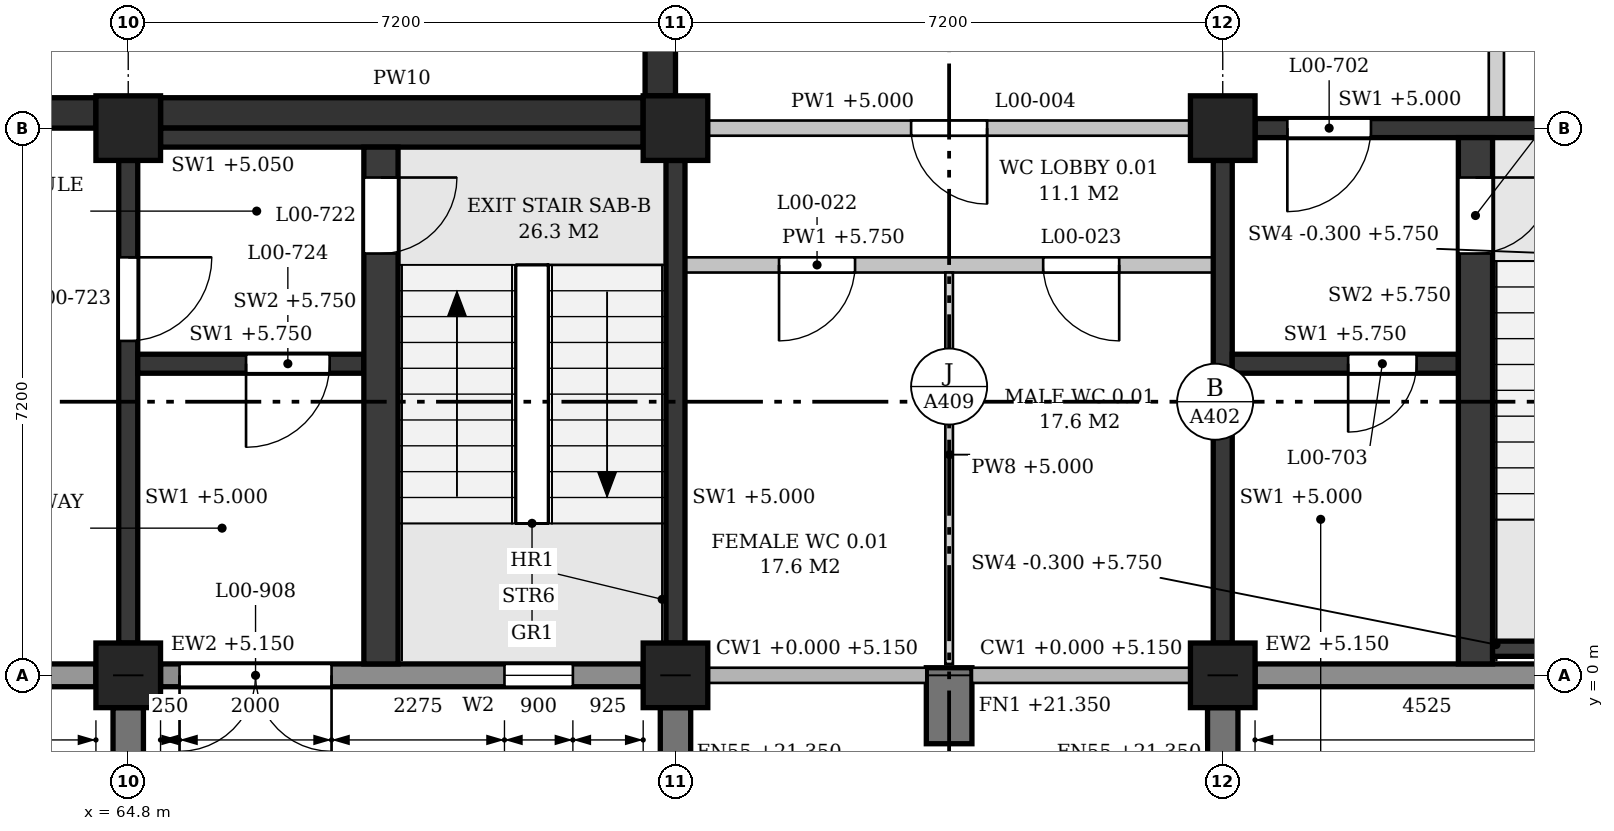
"""IFC4 building model, lengths in metres.
Left out: names, types, materials, properties, quantities, classifications, styles, units other than length and angle.
Written with IfcOpenShell. Run it as: python <this file> out.ifc"""

import sys

from ifc_helpers import new_model, si_unit, direction, frame, frame_2d, origin, origin_2d, place, context, subcontext, project, spatial, polyline, rectangle, outline, extrude, element, fill, save


model = new_model("IFC4")
c1 = context("Model", 3, precision=1e-05, world=origin(), true_north=direction((0.0, 1.0)))
c2 = subcontext(c1, "Body", "Model", "MODEL_VIEW")
j1 = project(units=[si_unit("LENGTHUNIT", "METRE"), si_unit("PLANEANGLEUNIT", "RADIAN")], contexts=[c1])
p1 = place(None, origin())
s1 = spatial("IfcSite", under=j1, at=p1, CompositionType="ELEMENT")
p2 = place(p1, origin())
s2 = spatial("IfcBuilding", under=s1, at=p2, CompositionType="ELEMENT")
p3 = place(p2, origin())
s3 = spatial("IfcBuildingStorey", under=s2, at=p3, CompositionType="ELEMENT", Elevation=0.0)
for number, where, z_axis, x_axis in (
    (1, (64.8, 0.0, 0.0), (0.0, 0.0, 1.0), (1.0, 0.0, 0.0)),
    (2, (64.8, 7.2, 0.0), (0.0, 0.0, 1.0), (1.0, 0.0, 0.0)),
    (3, (72.0, 0.0, 0.0), (0.0, 0.0, 1.0), (1.0, 0.0, 0.0)),
    (4, (72.0, 7.2, 0.0), (0.0, 0.0, 1.0), (1.0, 0.0, 0.0)),
    (5, (79.2, 0.0, 0.0), (0.0, 0.0, 1.0), (1.0, 0.0, 0.0)),
    (6, (79.2, 7.2, 0.0), (0.0, 0.0, 1.0), (1.0, 0.0, 0.0)),
):
    element("IfcColumn", number, at=place(p3, frame(where, z_axis=z_axis, x_axis=x_axis)), inside=s3, PredefinedType="COLUMN", context=c2, shape_type="SweptSolid", body=[
        extrude(rectangle(XDim=0.85, YDim=0.85, at=origin_2d()), origin(), (0.0, 0.0, 1.0), 6.0),
    ])
p4 = place(p3, frame((58.025, 0.0, 0.0), z_axis=(0.0, 0.0, 1.0), x_axis=(1.0, 0.0, 0.0)))
e7 = element("IfcWall", 7, at=p4, inside=s3, PredefinedType="STANDARD", context=c2, shape_type="SweptSolid", body=[
    extrude(rectangle(XDim=6.35, YDim=0.3, at=frame_2d((3.175, 0.0))), origin(), (0.0, 0.0, 1.0), 5.15),
])
p5 = place(p4, frame((1.975, 0.0, 0.0)))
e8 = element("IfcOpeningElement", 8, at=p5, cuts=e7, PredefinedType="OPENING", context=c2, shape_type="SweptSolid", body=[
    extrude(outline(polyline([(0.0, 0.0), (2.4, 0.0), (2.4, 2.0), (1.2, 3.2), (0.0, 2.0), (0.0, 0.0)])), frame((0.0, 0.16, 0.0), z_axis=(0.0, -1.0, 0.0), x_axis=(1.0, 0.0, 0.0)), (0.0, 0.0, 1.0), 0.32),
])
p6 = place(p3, frame((65.225, 0.0, 0.0), z_axis=(0.0, 0.0, 1.0), x_axis=(1.0, 0.0, 0.0)))
e9 = element("IfcWall", 9, at=p6, inside=s3, PredefinedType="STANDARD", context=c2, shape_type="SweptSolid", body=[
    extrude(rectangle(XDim=6.35, YDim=0.3, at=frame_2d((3.175, 0.0))), origin(), (0.0, 0.0, 1.0), 5.15),
])
p7 = place(p6, frame((0.25, 0.0, 0.0)))
e10 = element("IfcOpeningElement", 10, at=p7, cuts=e9, PredefinedType="OPENING", context=c2, shape_type="SweptSolid", body=[
    extrude(rectangle(XDim=2.0, YDim=2.1, at=frame_2d((1.0, 1.05))), frame((0.0, 0.16, 0.0), z_axis=(0.0, -1.0, 0.0), x_axis=(1.0, 0.0, 0.0)), (0.0, 0.0, 1.0), 0.32),
])
p8 = place(p6, frame((4.525, 0.0, 0.9)))
e11 = element("IfcOpeningElement", 11, at=p8, cuts=e9, PredefinedType="OPENING", context=c2, shape_type="SweptSolid", body=[
    extrude(outline(polyline([(0.0, 0.0), (0.9, 0.0), (0.9, 3.55), (0.45, 4.0), (0.0, 3.55), (0.0, 0.0)])), frame((0.0, 0.16, 0.0), z_axis=(0.0, -1.0, 0.0), x_axis=(1.0, 0.0, 0.0)), (0.0, 0.0, 1.0), 0.32),
])
p9 = place(p3, frame((79.625, 0.0, 0.0), z_axis=(0.0, 0.0, 1.0), x_axis=(1.0, 0.0, 0.0)))
e12 = element("IfcWall", 12, at=p9, inside=s3, PredefinedType="STANDARD", context=c2, shape_type="SweptSolid", body=[
    extrude(rectangle(XDim=6.35, YDim=0.3, at=frame_2d((3.175, 0.0))), origin(), (0.0, 0.0, 1.0), 5.15),
])
p10 = place(p9, frame((4.525, 0.0, 0.9)))
e13 = element("IfcOpeningElement", 13, at=p10, cuts=e12, PredefinedType="OPENING", context=c2, shape_type="SweptSolid", body=[
    extrude(outline(polyline([(0.0, 0.0), (0.9, 0.0), (0.9, 3.55), (0.45, 4.0), (0.0, 3.55), (0.0, 0.0)])), frame((0.0, 0.16, 0.0), z_axis=(0.0, -1.0, 0.0), x_axis=(1.0, 0.0, 0.0)), (0.0, 0.0, 1.0), 0.32),
])
p11 = place(p3, frame((75.6, 0.1, 0.0), z_axis=(0.0, 0.0, 1.0), x_axis=(0.0, -1.0, 0.0)))
e14 = element("IfcWall", 14, at=p11, inside=s3, PredefinedType="POLYGONAL", context=c2, shape_type="SweptSolid", body=[
    extrude(outline(polyline([(1.0, 0.0), (1.0, 20.975), (0.75, 21.35), (0.35, 21.35), (0.35, 20.75), (0.0, 20.75), (0.0, 16.8), (0.35, 16.8), (0.35, 15.95), (0.0, 15.95), (0.0, 11.4), (0.35, 11.4), (0.35, 10.55), (0.0, 10.55), (0.0, 6.0), (0.35, 6.0), (0.35, 5.15), (0.0, 5.15), (0.0, 0.0), (1.0, 0.0)])), frame((0.0, 0.3, 0.0), z_axis=(0.0, -1.0, 0.0), x_axis=(1.0, 0.0, 0.0)), (0.0, 0.0, 1.0), 0.6),
])
p12 = place(p3, frame((64.8, -0.425, 0.0), z_axis=(0.0, 0.0, 1.0), x_axis=(0.0, -1.0, 0.0)))
e15 = element("IfcWall", 15, at=p12, inside=s3, PredefinedType="POLYGONAL", context=c2, shape_type="SweptSolid", body=[
    extrude(outline(polyline([(1.2, 0.0), (1.2, 9.825), (0.15, 11.4), (0.0, 11.4), (0.0, 0.0), (1.2, 0.0)])), frame((0.0, 0.2, 0.0), z_axis=(0.0, -1.0, 0.0), x_axis=(1.0, 0.0, 0.0)), (0.0, 0.0, 1.0), 0.4),
])
for number, where, z_axis, x_axis in (
    (16, (72.0, -0.425, 0.0), (0.0, 0.0, 1.0), (0.0, -1.0, 0.0)),
    (17, (79.2, -0.425, 0.0), (0.0, 0.0, 1.0), (0.0, -1.0, 0.0)),
):
    element("IfcWall", number, at=place(p3, frame(where, z_axis=z_axis, x_axis=x_axis)), inside=s3, PredefinedType="POLYGONAL", context=c2, shape_type="SweptSolid", body=[
        extrude(outline(polyline([(1.2, 0.0), (1.2, 20.825), (0.85, 21.35), (0.0, 21.35), (0.0, 0.0), (1.2, 0.0)])), frame((0.0, 0.2, 0.0), z_axis=(0.0, -1.0, 0.0), x_axis=(1.0, 0.0, 0.0)), (0.0, 0.0, 1.0), 0.4),
    ])
p13 = place(p3, frame((79.625, 7.2, 0.0), z_axis=(0.0, 0.0, 1.0), x_axis=(1.0, 0.0, 0.0)))
e18 = element("IfcWall", 18, at=p13, inside=s3, PredefinedType="SHEAR", context=c2, shape_type="SweptSolid", body=[
    extrude(rectangle(XDim=6.35, YDim=0.25, at=frame_2d((3.175, 0.0))), origin(), (0.0, 0.0, 1.0), 5.0),
])
p14 = place(p13, frame((0.425, 0.0, 0.0)))
e19 = element("IfcOpeningElement", 19, at=p14, cuts=e18, PredefinedType="OPENING", context=c2, shape_type="SweptSolid", body=[
    extrude(rectangle(XDim=1.1, YDim=2.1, at=frame_2d((0.55, 1.05))), frame((0.0, 0.135, 0.0), z_axis=(0.0, -1.0, 0.0), x_axis=(1.0, 0.0, 0.0)), (0.0, 0.0, 1.0), 0.27),
])
p15 = place(p3, frame((79.2, 0.425, 0.0), z_axis=(0.0, 0.0, 1.0), x_axis=(0.0, 1.0, 0.0)))
e20 = element("IfcWall", 20, at=p15, inside=s3, PredefinedType="SHEAR", context=c2, shape_type="SweptSolid", body=[
    extrude(rectangle(XDim=6.35, YDim=0.25, at=frame_2d((3.175, 0.0))), origin(), (0.0, 0.0, 1.0), 5.0),
])
p16 = place(p3, frame((82.75, 0.35, -0.3), z_axis=(0.0, 0.0, 1.0), x_axis=(1.0, 0.0, 0.0)))
e21 = element("IfcWall", 21, at=p16, inside=s3, PredefinedType="SHEAR", context=c2, shape_type="SweptSolid", body=[
    extrude(rectangle(XDim=1.4, YDim=0.2, at=frame_2d((0.7, 0.0))), origin(), (0.0, 0.0, 1.0), 6.05),
])
p17 = place(p3, frame((82.525, 0.15, 0.0), z_axis=(0.0, 0.0, 1.0), x_axis=(0.0, 1.0, 0.0)))
e22 = element("IfcWall", 22, at=p17, inside=s3, PredefinedType="SHEAR", context=c2, shape_type="SweptSolid", body=[
    extrude(rectangle(XDim=6.925, YDim=0.45, at=frame_2d((3.462, 0.0))), origin(), (0.0, 0.0, 1.0), 5.75),
])
p18 = place(p17, frame((5.4, 0.0, 0.0)))
e23 = element("IfcOpeningElement", 23, at=p18, cuts=e22, PredefinedType="OPENING", context=c2, shape_type="SweptSolid", body=[
    extrude(rectangle(XDim=1.0, YDim=2.1, at=frame_2d((0.5, 1.05))), frame((0.0, 0.235, 0.0), z_axis=(0.0, -1.0, 0.0), x_axis=(1.0, 0.0, 0.0)), (0.0, 0.0, 1.0), 0.47),
])
p19 = place(p3, frame((79.325, 4.1, 0.0), z_axis=(0.0, 0.0, 1.0), x_axis=(1.0, 0.0, 0.0)))
e24 = element("IfcWall", 24, at=p19, inside=s3, PredefinedType="SHEAR", context=c2, shape_type="SweptSolid", body=[
    extrude(rectangle(XDim=2.975, YDim=0.25, at=frame_2d((1.488, 0.0))), origin(), (0.0, 0.0, 1.0), 5.75),
])
p20 = place(p19, frame((1.525, 0.0, 0.0)))
e25 = element("IfcOpeningElement", 25, at=p20, cuts=e24, PredefinedType="OPENING", context=c2, shape_type="SweptSolid", body=[
    extrude(rectangle(XDim=0.9, YDim=2.1, at=frame_2d((0.45, 1.05))), frame((0.0, 0.135, 0.0), z_axis=(0.0, -1.0, 0.0), x_axis=(1.0, 0.0, 0.0)), (0.0, 0.0, 1.0), 0.27),
])
p21 = place(p3, frame((65.225, 7.075, 0.0), z_axis=(0.0, 0.0, 1.0), x_axis=(1.0, 0.0, 0.0)))
e26 = element("IfcWall", 26, at=p21, inside=s3, PredefinedType="SHEAR", context=c2, shape_type="SweptSolid", body=[
    extrude(rectangle(XDim=6.35, YDim=0.25, at=frame_2d((3.175, 0.0))), origin(), (0.0, 0.0, 1.0), 5.05),
])
p22 = place(p3, frame((72.0, 0.425, 0.0), z_axis=(0.0, 0.0, 1.0), x_axis=(0.0, 1.0, 0.0)))
e27 = element("IfcWall", 27, at=p22, inside=s3, PredefinedType="SHEAR", context=c2, shape_type="SweptSolid", body=[
    extrude(rectangle(XDim=6.35, YDim=0.25, at=frame_2d((3.175, 0.0))), origin(), (0.0, 0.0, 1.0), 5.0),
])
p23 = place(p3, frame((64.8, 0.425, 0.0), z_axis=(0.0, 0.0, 1.0), x_axis=(0.0, 1.0, 0.0)))
e28 = element("IfcWall", 28, at=p23, inside=s3, PredefinedType="SHEAR", context=c2, shape_type="SweptSolid", body=[
    extrude(rectangle(XDim=6.35, YDim=0.25, at=frame_2d((3.175, 0.0))), origin(), (0.0, 0.0, 1.0), 5.0),
])
p24 = place(p23, frame((3.975, 0.0, 0.0)))
e29 = element("IfcOpeningElement", 29, at=p24, cuts=e28, PredefinedType="OPENING", context=c2, shape_type="SweptSolid", body=[
    extrude(rectangle(XDim=1.1, YDim=2.1, at=frame_2d((0.55, 1.05))), frame((0.0, 0.135, 0.0), z_axis=(0.0, -1.0, 0.0), x_axis=(1.0, 0.0, 0.0)), (0.0, 0.0, 1.0), 0.27),
])
p25 = place(p3, frame((68.125, 0.15, 0.0), z_axis=(0.0, 0.0, 1.0), x_axis=(0.0, 1.0, 0.0)))
e30 = element("IfcWall", 30, at=p25, inside=s3, PredefinedType="SHEAR", context=c2, shape_type="SweptSolid", body=[
    extrude(rectangle(XDim=6.8, YDim=0.45, at=frame_2d((3.4, 0.0))), origin(), (0.0, 0.0, 1.0), 5.75),
])
p26 = place(p25, frame((5.4, 0.0, 0.0)))
e31 = element("IfcOpeningElement", 31, at=p26, cuts=e30, PredefinedType="OPENING", context=c2, shape_type="SweptSolid", body=[
    extrude(rectangle(XDim=1.0, YDim=2.1, at=frame_2d((0.5, 1.05))), frame((0.0, 0.235, 0.0), z_axis=(0.0, -1.0, 0.0), x_axis=(1.0, 0.0, 0.0)), (0.0, 0.0, 1.0), 0.47),
])
p27 = place(p3, frame((64.925, 4.1, 0.0), z_axis=(0.0, 0.0, 1.0), x_axis=(1.0, 0.0, 0.0)))
e32 = element("IfcWall", 32, at=p27, inside=s3, PredefinedType="SHEAR", context=c2, shape_type="SweptSolid", body=[
    extrude(rectangle(XDim=2.975, YDim=0.25, at=frame_2d((1.487, 0.0))), origin(), (0.0, 0.0, 1.0), 5.75),
])
p28 = place(p27, frame((1.425, 0.0, 0.0)))
e33 = element("IfcOpeningElement", 33, at=p28, cuts=e32, PredefinedType="OPENING", context=c2, shape_type="SweptSolid", body=[
    extrude(rectangle(XDim=1.1, YDim=2.1, at=frame_2d((0.55, 1.05))), frame((0.0, 0.135, 0.0), z_axis=(0.0, -1.0, 0.0), x_axis=(1.0, 0.0, 0.0)), (0.0, 0.0, 1.0), 0.27),
])
p29 = place(p3, frame((72.125, 5.4, 0.0), z_axis=(0.0, 0.0, 1.0), x_axis=(1.0, 0.0, 0.0)))
e34 = element("IfcWall", 34, at=p29, inside=s3, PredefinedType="PARTITIONING", context=c2, shape_type="SweptSolid", body=[
    extrude(outline(polyline([(0.0, 0.0), (6.95, 0.0), (6.95, 5.0), (6.825, 5.0), (6.825, 5.75), (0.125, 5.75), (0.125, 5.0), (0.0, 5.0), (0.0, 0.0)])), frame((0.0, 0.1, 0.0), z_axis=(0.0, -1.0, 0.0), x_axis=(1.0, 0.0, 0.0)), (0.0, 0.0, 1.0), 0.2),
])
p30 = place(p29, frame((1.238, 0.0, 0.0)))
e35 = element("IfcOpeningElement", 35, at=p30, cuts=e34, PredefinedType="OPENING", context=c2, shape_type="SweptSolid", body=[
    extrude(rectangle(XDim=1.0, YDim=2.1, at=frame_2d((0.5, 1.05))), frame((0.0, 0.11, 0.0), z_axis=(0.0, -1.0, 0.0), x_axis=(1.0, 0.0, 0.0)), (0.0, 0.0, 1.0), 0.22),
])
p31 = place(p29, frame((4.712, 0.0, 0.0)))
e36 = element("IfcOpeningElement", 36, at=p31, cuts=e34, PredefinedType="OPENING", context=c2, shape_type="SweptSolid", body=[
    extrude(rectangle(XDim=1.0, YDim=2.1, at=frame_2d((0.5, 1.05))), frame((0.0, 0.11, 0.0), z_axis=(0.0, -1.0, 0.0), x_axis=(1.0, 0.0, 0.0)), (0.0, 0.0, 1.0), 0.22),
])
p32 = place(p3, frame((72.425, 7.2, 0.0), z_axis=(0.0, 0.0, 1.0), x_axis=(1.0, 0.0, 0.0)))
e37 = element("IfcWall", 37, at=p32, inside=s3, PredefinedType="PARTITIONING", context=c2, shape_type="SweptSolid", body=[
    extrude(rectangle(XDim=6.35, YDim=0.2, at=frame_2d((3.175, 0.0))), origin(), (0.0, 0.0, 1.0), 5.0),
])
p33 = place(p32, frame((2.675, 0.0, 0.0)))
e38 = element("IfcOpeningElement", 38, at=p33, cuts=e37, PredefinedType="OPENING", context=c2, shape_type="SweptSolid", body=[
    extrude(rectangle(XDim=1.0, YDim=2.1, at=frame_2d((0.5, 1.05))), frame((0.0, 0.11, 0.0), z_axis=(0.0, -1.0, 0.0), x_axis=(1.0, 0.0, 0.0)), (0.0, 0.0, 1.0), 0.22),
])
p34 = place(p3, frame((58.025, 7.4, 0.0), z_axis=(0.0, 0.0, 1.0), x_axis=(1.0, 0.0, 0.0)))
e39 = element("IfcWall", 39, at=p34, inside=s3, PredefinedType="SOLIDWALL", context=c2, shape_type="SweptSolid", body=[
    extrude(rectangle(XDim=6.35, YDim=0.4, at=frame_2d((3.175, 0.0))), origin(), (0.0, 0.0, 1.0), 10.7),
])
p35 = place(p34, frame((2.575, 0.0, 0.0)))
e40 = element("IfcOpeningElement", 40, at=p35, cuts=e39, PredefinedType="OPENING", context=c2, shape_type="SweptSolid", body=[
    extrude(rectangle(XDim=1.2, YDim=2.1, at=frame_2d((0.6, 1.05))), frame((0.0, 0.21, 0.0), z_axis=(0.0, -1.0, 0.0), x_axis=(1.0, 0.0, 0.0)), (0.0, 0.0, 1.0), 0.42),
])
p36 = place(p3, frame((65.225, 7.4, 0.0), z_axis=(0.0, 0.0, 1.0), x_axis=(1.0, 0.0, 0.0)))
e41 = element("IfcWall", 41, at=p36, inside=s3, PredefinedType="SOLIDWALL", context=c2, shape_type="SweptSolid", body=[
    extrude(rectangle(XDim=6.35, YDim=0.4, at=frame_2d((3.175, 0.0))), origin(), (0.0, 0.0, 1.0), 10.7),
])
p37 = place(p3, frame((71.8, 7.625, 0.0), z_axis=(0.0, 0.0, 1.0), x_axis=(0.0, 1.0, 0.0)))
e42 = element("IfcWall", 42, at=p37, inside=s3, PredefinedType="SOLIDWALL", context=c2, shape_type="SweptSolid", body=[
    extrude(rectangle(XDim=6.35, YDim=0.4, at=frame_2d((3.175, 0.0))), origin(), (0.0, 0.0, 1.0), 10.55),
])
p38 = place(p3, frame((75.6, 0.15, 0.0), z_axis=(0.0, 0.0, 1.0), x_axis=(0.0, 1.0, 0.0)))
e43 = element("IfcWall", 43, at=p38, inside=s3, PredefinedType="PARTITIONING", context=c2, shape_type="SweptSolid", body=[
    extrude(rectangle(XDim=5.15, YDim=0.1, at=frame_2d((2.575, 0.0))), origin(), (0.0, 0.0, 1.0), 5.0),
])
p39 = place(p3, frame((82.8, 7.325, 0.0), z_axis=(0.0, 0.0, 1.0), x_axis=(0.0, 1.0, 0.0)))
e44 = element("IfcWall", 44, at=p39, inside=s3, PredefinedType="PARTITIONING", context=c2, shape_type="SweptSolid", body=[
    extrude(outline(polyline([(0.0, 0.0), (7.075, 0.0), (7.075, 5.0), (6.825, 5.0), (6.825, 5.75), (0.125, 5.75), (0.125, 5.0), (0.0, 5.0), (0.0, 0.0)])), frame((0.0, 0.1, 0.0), z_axis=(0.0, -1.0, 0.0), x_axis=(1.0, 0.0, 0.0)), (0.0, 0.0, 1.0), 0.2),
])
p40 = place(p39, frame((2.938, 0.0, 0.0)))
e45 = element("IfcOpeningElement", 45, at=p40, cuts=e44, PredefinedType="OPENING", context=c2, shape_type="SweptSolid", body=[
    extrude(rectangle(XDim=1.2, YDim=2.1, at=frame_2d((0.6, 1.05))), frame((0.0, 0.11, 0.0), z_axis=(0.0, -1.0, 0.0), x_axis=(1.0, 0.0, 0.0)), (0.0, 0.0, 1.0), 0.22),
])
p41 = place(p7, frame((2.0, 0.0, 0.0), z_axis=(0.0, 0.0, 1.0), x_axis=(-1.0, 0.0, 0.0)))
e46 = element("IfcDoor", 46, at=p41, inside=s3, OperationType="DOUBLE_DOOR_SINGLE_SWING", PredefinedType="DOOR", context=c2, shape_type="SweptSolid", body=[
    extrude(rectangle(XDim=2.0, YDim=2.1, at=frame_2d((1.0, 1.05))), frame((0.0, 0.025, 0.0), z_axis=(0.0, -1.0, 0.0), x_axis=(1.0, 0.0, 0.0)), (0.0, 0.0, 1.0), 0.05),
])
fill(e10, e46)
p42 = place(p8, origin())
e47 = element("IfcWindow", 47, at=p42, inside=s3, PartitioningType="SINGLE_PANEL", PredefinedType="WINDOW", context=c2, shape_type="SweptSolid", body=[
    extrude(outline(polyline([(0.0, 0.0), (0.9, 0.0), (0.9, 3.55), (0.45, 4.0), (0.0, 3.55), (0.0, 0.0)])), frame((0.0, 0.03, 0.0), z_axis=(0.0, -1.0, 0.0), x_axis=(1.0, 0.0, 0.0)), (0.0, 0.0, 1.0), 0.06),
])
fill(e11, e47)
p43 = place(p18, frame((1.0, 0.0, 0.0), z_axis=(0.0, 0.0, 1.0), x_axis=(-1.0, 0.0, 0.0)))
e48 = element("IfcDoor", 48, at=p43, inside=s3, OperationType="SINGLE_SWING_LEFT", PredefinedType="DOOR", context=c2, shape_type="SweptSolid", body=[
    extrude(rectangle(XDim=1.0, YDim=2.1, at=frame_2d((0.5, 1.05))), frame((0.0, 0.025, 0.0), z_axis=(0.0, -1.0, 0.0), x_axis=(1.0, 0.0, 0.0)), (0.0, 0.0, 1.0), 0.05),
])
fill(e23, e48)
p44 = place(p14, frame((1.1, 0.0, 0.0), z_axis=(0.0, 0.0, 1.0), x_axis=(-1.0, 0.0, 0.0)))
e49 = element("IfcDoor", 49, at=p44, inside=s3, OperationType="SINGLE_SWING_RIGHT", PredefinedType="DOOR", context=c2, shape_type="SweptSolid", body=[
    extrude(rectangle(XDim=1.1, YDim=2.1, at=frame_2d((0.55, 1.05))), frame((0.0, 0.025, 0.0), z_axis=(0.0, -1.0, 0.0), x_axis=(1.0, 0.0, 0.0)), (0.0, 0.0, 1.0), 0.05),
])
fill(e19, e49)
p45 = place(p20, frame((0.9, 0.0, 0.0), z_axis=(0.0, 0.0, 1.0), x_axis=(-1.0, 0.0, 0.0)))
e50 = element("IfcDoor", 50, at=p45, inside=s3, OperationType="SINGLE_SWING_RIGHT", PredefinedType="DOOR", context=c2, shape_type="SweptSolid", body=[
    extrude(rectangle(XDim=0.9, YDim=2.1, at=frame_2d((0.45, 1.05))), frame((0.0, 0.025, 0.0), z_axis=(0.0, -1.0, 0.0), x_axis=(1.0, 0.0, 0.0)), (0.0, 0.0, 1.0), 0.05),
])
fill(e25, e50)
p46 = place(p26, frame((1.0, 0.0, 0.0), z_axis=(0.0, 0.0, 1.0), x_axis=(-1.0, 0.0, 0.0)))
e51 = element("IfcDoor", 51, at=p46, inside=s3, OperationType="SINGLE_SWING_LEFT", PredefinedType="DOOR", context=c2, shape_type="SweptSolid", body=[
    extrude(rectangle(XDim=1.0, YDim=2.1, at=frame_2d((0.5, 1.05))), frame((0.0, 0.025, 0.0), z_axis=(0.0, -1.0, 0.0), x_axis=(1.0, 0.0, 0.0)), (0.0, 0.0, 1.0), 0.05),
])
fill(e31, e51)
p47 = place(p24, frame((1.1, 0.0, 0.0), z_axis=(0.0, 0.0, 1.0), x_axis=(-1.0, 0.0, 0.0)))
e52 = element("IfcDoor", 52, at=p47, inside=s3, OperationType="SINGLE_SWING_LEFT", PredefinedType="DOOR", context=c2, shape_type="SweptSolid", body=[
    extrude(rectangle(XDim=1.1, YDim=2.1, at=frame_2d((0.55, 1.05))), frame((0.0, 0.025, 0.0), z_axis=(0.0, -1.0, 0.0), x_axis=(1.0, 0.0, 0.0)), (0.0, 0.0, 1.0), 0.05),
])
fill(e29, e52)
p48 = place(p28, frame((1.1, 0.0, 0.0), z_axis=(0.0, 0.0, 1.0), x_axis=(-1.0, 0.0, 0.0)))
e53 = element("IfcDoor", 53, at=p48, inside=s3, OperationType="SINGLE_SWING_RIGHT", PredefinedType="DOOR", context=c2, shape_type="SweptSolid", body=[
    extrude(rectangle(XDim=1.1, YDim=2.1, at=frame_2d((0.55, 1.05))), frame((0.0, 0.025, 0.0), z_axis=(0.0, -1.0, 0.0), x_axis=(1.0, 0.0, 0.0)), (0.0, 0.0, 1.0), 0.05),
])
fill(e33, e53)
p49 = place(p33, frame((1.0, 0.0, 0.0), z_axis=(0.0, 0.0, 1.0), x_axis=(-1.0, 0.0, 0.0)))
e54 = element("IfcDoor", 54, at=p49, inside=s3, OperationType="SINGLE_SWING_LEFT", PredefinedType="DOOR", context=c2, shape_type="SweptSolid", body=[
    extrude(rectangle(XDim=1.0, YDim=2.1, at=frame_2d((0.5, 1.05))), frame((0.0, 0.025, 0.0), z_axis=(0.0, -1.0, 0.0), x_axis=(1.0, 0.0, 0.0)), (0.0, 0.0, 1.0), 0.05),
])
fill(e38, e54)
p50 = place(p30, frame((1.0, 0.0, 0.0), z_axis=(0.0, 0.0, 1.0), x_axis=(-1.0, 0.0, 0.0)))
e55 = element("IfcDoor", 55, at=p50, inside=s3, OperationType="SINGLE_SWING_RIGHT", PredefinedType="DOOR", context=c2, shape_type="SweptSolid", body=[
    extrude(rectangle(XDim=1.0, YDim=2.1, at=frame_2d((0.5, 1.05))), frame((0.0, 0.025, 0.0), z_axis=(0.0, -1.0, 0.0), x_axis=(1.0, 0.0, 0.0)), (0.0, 0.0, 1.0), 0.05),
])
fill(e35, e55)
p51 = place(p31, frame((1.0, 0.0, 0.0), z_axis=(0.0, 0.0, 1.0), x_axis=(-1.0, 0.0, 0.0)))
e56 = element("IfcDoor", 56, at=p51, inside=s3, OperationType="SINGLE_SWING_LEFT", PredefinedType="DOOR", context=c2, shape_type="SweptSolid", body=[
    extrude(rectangle(XDim=1.0, YDim=2.1, at=frame_2d((0.5, 1.05))), frame((0.0, 0.025, 0.0), z_axis=(0.0, -1.0, 0.0), x_axis=(1.0, 0.0, 0.0)), (0.0, 0.0, 1.0), 0.05),
])
fill(e36, e56)
save(model, sys.argv[1])
